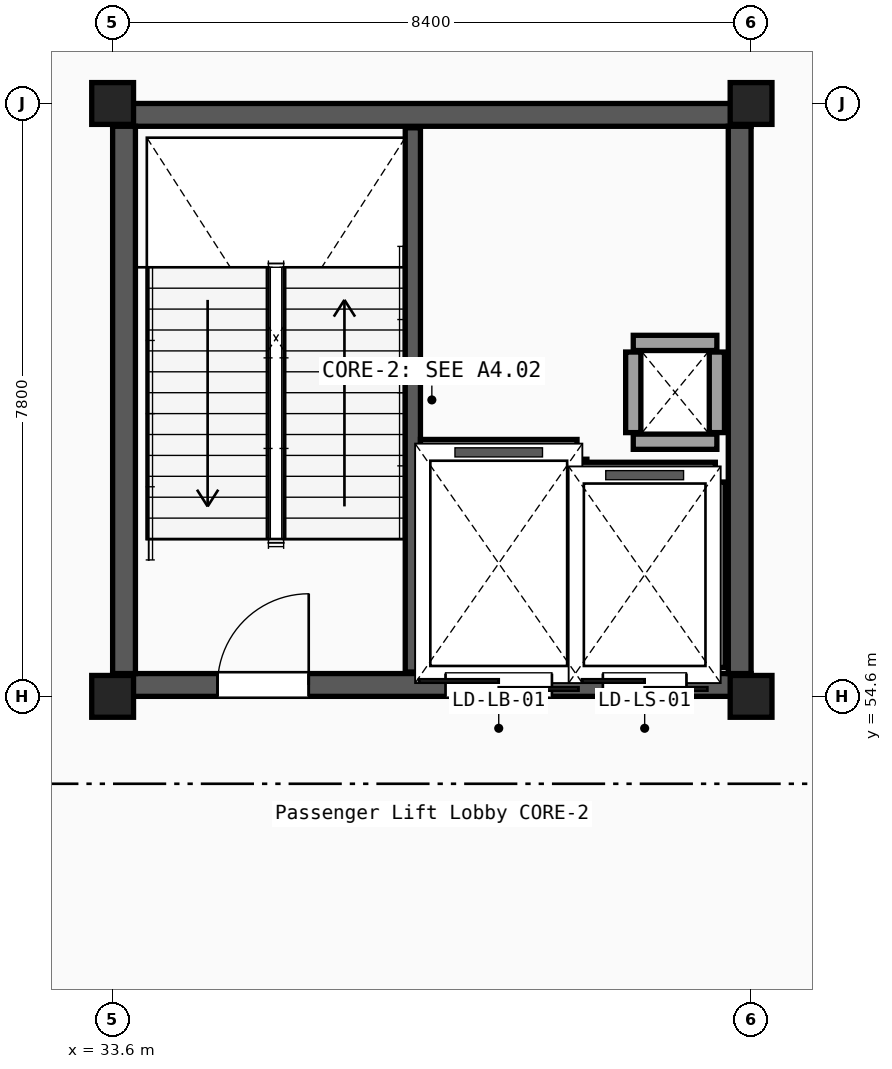
"""IFC4 building model, lengths in metres.
Left out: names, types, materials, properties, quantities, classifications, styles, units other than length and angle.
Written with IfcOpenShell. Run it as: python <this file> out.ifc"""

import sys

from ifc_helpers import new_model, si_unit, direction, frame, frame_2d, origin, origin_2d, place, context, subcontext, project, spatial, rectangle, i_section, extrude, element, fill, save


model = new_model("IFC4")
c1 = context("Model", 3, precision=1e-05, world=origin(), true_north=direction((0.0, 1.0)))
c2 = subcontext(c1, "Body", "Model", "MODEL_VIEW")
j1 = project(units=[si_unit("LENGTHUNIT", "METRE"), si_unit("PLANEANGLEUNIT", "RADIAN")], contexts=[c1])
p1 = place(None, origin())
s1 = spatial("IfcSite", under=j1, at=p1, CompositionType="ELEMENT")
p2 = place(p1, origin())
s2 = spatial("IfcBuilding", under=s1, at=p2, CompositionType="ELEMENT")
p3 = place(p2, frame((0.0, 0.0, 5.1)))
s3 = spatial("IfcBuildingStorey", under=s2, at=p3, CompositionType="ELEMENT", Elevation=5.1)
for number, where, z_axis, x_axis in (
    (1, (33.6, 54.6, 0.0), (0.0, 0.0, 1.0), (1.0, 0.0, 0.0)),
    (2, (33.6, 62.4, 0.0), (0.0, 0.0, 1.0), (1.0, 0.0, 0.0)),
    (3, (42.0, 54.6, 0.0), (0.0, 0.0, 1.0), (1.0, 0.0, 0.0)),
    (4, (42.0, 62.4, 0.0), (0.0, 0.0, 1.0), (1.0, 0.0, 0.0)),
):
    element("IfcColumn", number, at=place(p3, frame(where, z_axis=z_axis, x_axis=x_axis)), inside=s3, PredefinedType="COLUMN", context=c2, shape_type="SweptSolid", body=[
        extrude(i_section(OverallWidth=0.3, OverallDepth=0.55, WebThickness=0.015, FlangeThickness=0.029, FilletRadius=0.027, at=origin_2d()), origin(), (0.0, 0.0, 1.0), 5.1),
    ])
p4 = place(p3, frame((33.6, 54.75, 0.0), z_axis=(0.0, 0.0, 1.0), x_axis=(1.0, 0.0, 0.0)))
e5 = element("IfcWall", 5, at=p4, inside=s3, PredefinedType="SHEAR", context=c2, shape_type="SweptSolid", body=[
    extrude(rectangle(XDim=8.4, YDim=0.3, at=frame_2d((4.2, 0.0))), origin(), (0.0, 0.0, 1.0), 4.83),
])
p5 = place(p4, frame((1.38, 0.0, 0.0)))
e6 = element("IfcOpeningElement", 6, at=p5, cuts=e5, PredefinedType="OPENING", context=c2, shape_type="SweptSolid", body=[
    extrude(rectangle(XDim=1.2, YDim=2.15, at=frame_2d((0.6, 1.075))), frame((0.0, 0.16, 0.0), z_axis=(0.0, -1.0, 0.0), x_axis=(1.0, 0.0, 0.0)), (0.0, 0.0, 1.0), 0.32),
])
p6 = place(p4, frame((4.38, 0.0, 0.0)))
e7 = element("IfcOpeningElement", 7, at=p6, cuts=e5, PredefinedType="OPENING", context=c2, shape_type="SweptSolid", body=[
    extrude(rectangle(XDim=1.4, YDim=2.2, at=frame_2d((0.7, 1.1))), frame((0.0, 0.16, 0.0), z_axis=(0.0, -1.0, 0.0), x_axis=(1.0, 0.0, 0.0)), (0.0, 0.0, 1.0), 0.32),
])
p7 = place(p4, frame((6.45, 0.0, 0.0)))
e8 = element("IfcOpeningElement", 8, at=p7, cuts=e5, PredefinedType="OPENING", context=c2, shape_type="SweptSolid", body=[
    extrude(rectangle(XDim=1.1, YDim=2.15, at=frame_2d((0.55, 1.075))), frame((0.0, 0.16, 0.0), z_axis=(0.0, -1.0, 0.0), x_axis=(1.0, 0.0, 0.0)), (0.0, 0.0, 1.0), 0.32),
])
p8 = place(p3, frame((33.6, 62.25, 0.0), z_axis=(0.0, 0.0, 1.0), x_axis=(1.0, 0.0, 0.0)))
e9 = element("IfcWall", 9, at=p8, inside=s3, PredefinedType="SHEAR", context=c2, shape_type="SweptSolid", body=[
    extrude(rectangle(XDim=8.4, YDim=0.3, at=frame_2d((4.2, 0.0))), origin(), (0.0, 0.0, 1.0), 4.83),
])
for number, where, z_axis, x_axis in (
    (10, (33.75, 54.9, 0.0), (0.0, 0.0, 1.0), (0.0, 1.0, 0.0)),
    (11, (41.85, 54.9, 0.0), (0.0, 0.0, 1.0), (0.0, 1.0, 0.0)),
):
    element("IfcWall", number, at=place(p3, frame(where, z_axis=z_axis, x_axis=x_axis)), inside=s3, PredefinedType="SHEAR", context=c2, shape_type="SweptSolid", body=[
        extrude(rectangle(XDim=7.2, YDim=0.3, at=frame_2d((3.6, 0.0))), origin(), (0.0, 0.0, 1.0), 4.83),
    ])
p9 = place(p3, frame((37.55, 54.92, 0.0), z_axis=(0.0, 0.0, 1.0), x_axis=(0.0, 1.0, 0.0)))
e12 = element("IfcWall", 12, at=p9, inside=s3, PredefinedType="SHEAR", context=c2, shape_type="SweptSolid", body=[
    extrude(rectangle(XDim=7.16, YDim=0.2, at=frame_2d((3.58, 0.0))), origin(), (0.0, 0.0, 1.0), 4.83),
])
for number, where, z_axis, x_axis in (
    (13, (40.45, 57.95, 0.0), (0.0, 0.0, 1.0), (1.0, 0.0, 0.0)),
    (14, (40.45, 59.25, 0.0), (0.0, 0.0, 1.0), (1.0, 0.0, 0.0)),
):
    element("IfcWall", number, at=place(p3, frame(where, z_axis=z_axis, x_axis=x_axis)), inside=s3, PredefinedType="PARTITIONING", context=c2, shape_type="SweptSolid", body=[
        extrude(rectangle(XDim=1.1, YDim=0.2, at=frame_2d((0.55, 0.0))), origin(), (0.0, 0.0, 1.0), 4.27),
    ])
for number, where, z_axis, x_axis in (
    (15, (40.45, 58.07, 0.0), (0.0, 0.0, 1.0), (0.0, 1.0, 0.0)),
    (16, (41.55, 58.07, 0.0), (0.0, 0.0, 1.0), (0.0, 1.0, 0.0)),
):
    element("IfcWall", number, at=place(p3, frame(where, z_axis=z_axis, x_axis=x_axis)), inside=s3, PredefinedType="PARTITIONING", context=c2, shape_type="SweptSolid", body=[
        extrude(rectangle(XDim=1.06, YDim=0.2, at=frame_2d((0.53, 0.0))), origin(), (0.0, 0.0, 1.0), 4.27),
    ])
p10 = place(p3, frame((39.74, 54.98, 0.0), z_axis=(0.0, 0.0, 1.0), x_axis=(0.0, 1.0, 0.0)))
e17 = element("IfcWall", 17, at=p10, inside=s3, PredefinedType="PARTITIONING", context=c2, shape_type="SweptSolid", body=[
    extrude(rectangle(XDim=2.74, YDim=0.2, at=frame_2d((1.37, 0.0))), origin(), (0.0, 0.0, 1.0), 4.27),
])
p11 = place(p3, frame((37.65, 57.88, 0.0), z_axis=(0.0, 0.0, 1.0), x_axis=(1.0, 0.0, 0.0)))
e18 = element("IfcWall", 18, at=p11, inside=s3, PredefinedType="PARTITIONING", context=c2, shape_type="SweptSolid", body=[
    extrude(rectangle(XDim=2.06, YDim=0.2, at=frame_2d((1.03, 0.0))), origin(), (0.0, 0.0, 1.0), 4.27),
])
p12 = place(p3, frame((41.56, 54.98, 0.0), z_axis=(0.0, 0.0, 1.0), x_axis=(0.0, 1.0, 0.0)))
e19 = element("IfcWall", 19, at=p12, inside=s3, PredefinedType="PARTITIONING", context=c2, shape_type="SweptSolid", body=[
    extrude(rectangle(XDim=2.44, YDim=0.2, at=frame_2d((1.22, 0.0))), origin(), (0.0, 0.0, 1.0), 4.27),
])
p13 = place(p3, frame((39.67, 57.58, 0.0), z_axis=(0.0, 0.0, 1.0), x_axis=(1.0, 0.0, 0.0)))
e20 = element("IfcWall", 20, at=p13, inside=s3, PredefinedType="PARTITIONING", context=c2, shape_type="SweptSolid", body=[
    extrude(rectangle(XDim=1.86, YDim=0.2, at=frame_2d((0.93, 0.0))), origin(), (0.0, 0.0, 1.0), 4.27),
])
p14 = place(p5, origin())
e21 = element("IfcDoor", 21, at=p14, inside=s3, OperationType="SINGLE_SWING_RIGHT", PredefinedType="DOOR", context=c2, shape_type="SweptSolid", body=[
    extrude(rectangle(XDim=1.2, YDim=2.15, at=frame_2d((0.6, 1.075))), frame((0.0, 0.025, 0.0), z_axis=(0.0, -1.0, 0.0), x_axis=(1.0, 0.0, 0.0)), (0.0, 0.0, 1.0), 0.05),
])
fill(e6, e21)
p15 = place(p6, origin())
e22 = element("IfcDoor", 22, at=p15, inside=s3, OperationType="DOUBLE_DOOR_SLIDING", PredefinedType="DOOR", context=c2, shape_type="SweptSolid", body=[
    extrude(rectangle(XDim=1.4, YDim=2.2, at=frame_2d((0.7, 1.1))), frame((0.0, 0.025, 0.0), z_axis=(0.0, -1.0, 0.0), x_axis=(1.0, 0.0, 0.0)), (0.0, 0.0, 1.0), 0.05),
])
fill(e7, e22)
p16 = place(p7, origin())
e23 = element("IfcDoor", 23, at=p16, inside=s3, OperationType="DOUBLE_DOOR_SLIDING", PredefinedType="DOOR", context=c2, shape_type="SweptSolid", body=[
    extrude(rectangle(XDim=1.1, YDim=2.15, at=frame_2d((0.55, 1.075))), frame((0.0, 0.025, 0.0), z_axis=(0.0, -1.0, 0.0), x_axis=(1.0, 0.0, 0.0)), (0.0, 0.0, 1.0), 0.05),
])
fill(e8, e23)
save(model, sys.argv[1])
